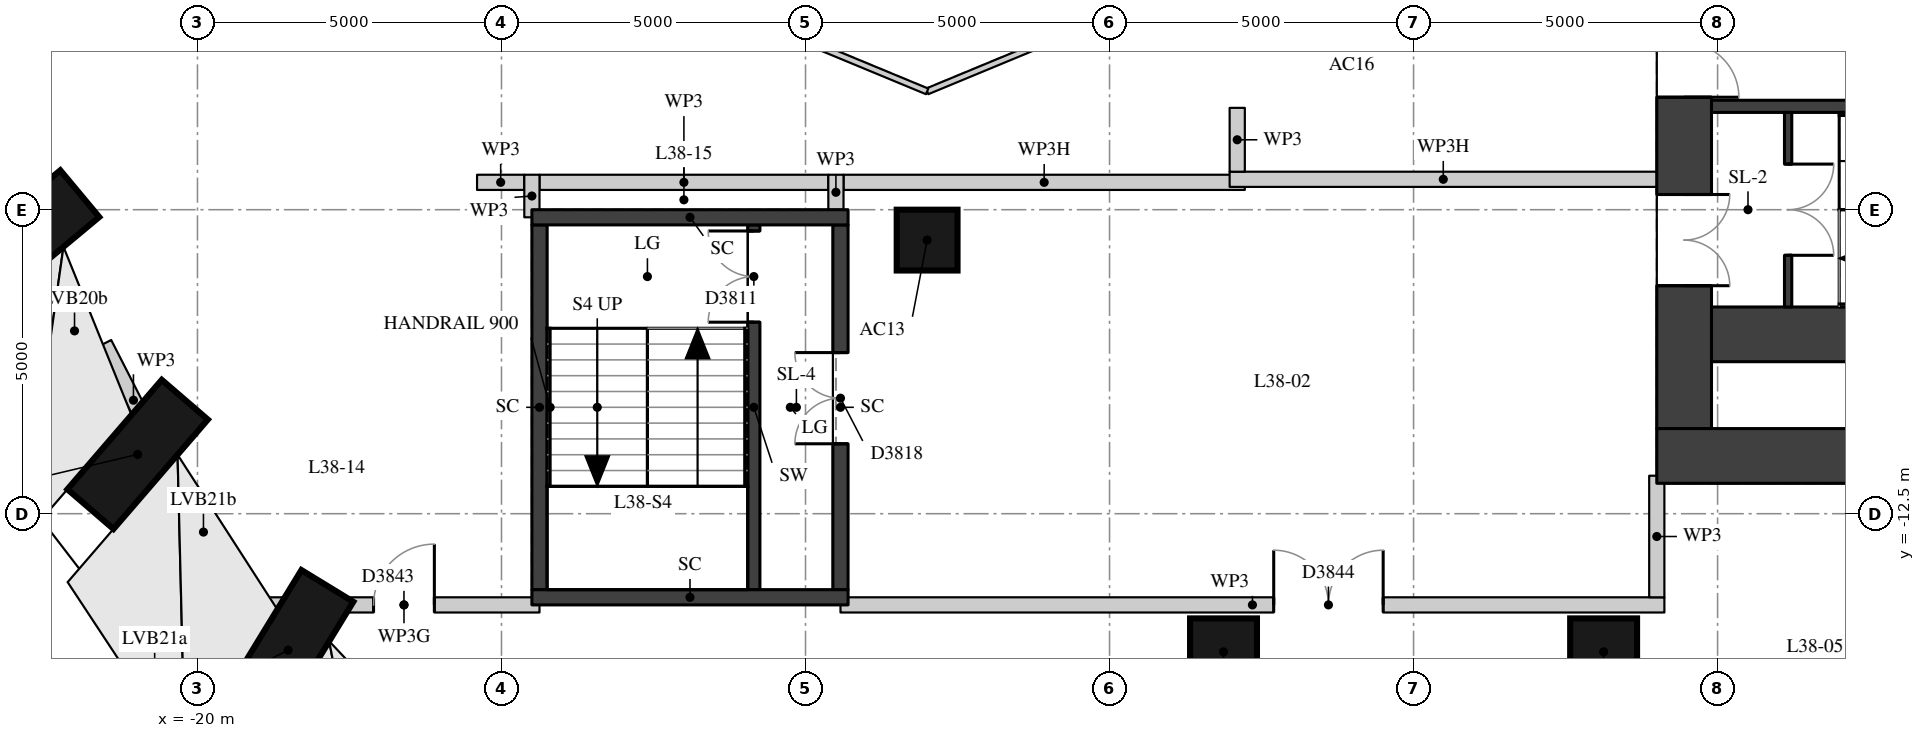
"""IFC4 building model, lengths in metres.
Left out: names, types, materials, properties, quantities, classifications, styles, units other than length and angle.
Written with IfcOpenShell. Run it as: python <this file> out.ifc"""

import sys

from ifc_helpers import new_model, si_unit, direction, frame, frame_2d, origin, origin_2d, place, context, subcontext, project, spatial, rectangle, extrude, element, fill, save


model = new_model("IFC4")
c1 = context("Model", 3, precision=1e-05, world=origin(), true_north=direction((0.0, 1.0)))
c2 = subcontext(c1, "Body", "Model", "MODEL_VIEW")
j1 = project(units=[si_unit("LENGTHUNIT", "METRE"), si_unit("PLANEANGLEUNIT", "RADIAN")], contexts=[c1])
p1 = place(None, origin())
s1 = spatial("IfcSite", under=j1, at=p1, CompositionType="ELEMENT")
p2 = place(p1, origin())
s2 = spatial("IfcBuilding", under=s1, at=p2, CompositionType="ELEMENT")
p3 = place(p2, frame((0.0, 0.0, 135.1)))
s3 = spatial("IfcBuildingStorey", under=s2, at=p3, CompositionType="ELEMENT", Elevation=135.1)
p4 = place(p3, frame((-24.854, -4.707, 0.373), z_axis=(0.429979574031, 0.250055041609, 0.867519476486), x_axis=(-0.749926104207, -0.436120259001, 0.497403214624)))
e1 = element("IfcColumn", 1, at=p4, inside=s3, PredefinedType="COLUMN", context=c2, shape_type="SweptSolid", body=[
    extrude(rectangle(XDim=1.5, YDim=1.0, at=origin_2d()), origin(), (0.0, 0.0, 1.0), 4.327),
])
p5 = place(p3, frame((-23.679, -8.689, 0.391), z_axis=(0.40014977533, 0.333402102722, 0.853652854036), x_axis=(-0.655839459848, -0.546441028941, 0.520842399192)))
e2 = element("IfcColumn", 2, at=p5, inside=s3, PredefinedType="COLUMN", context=c2, shape_type="SweptSolid", body=[
    extrude(rectangle(XDim=1.5, YDim=1.0, at=origin_2d()), origin(), (0.0, 0.0, 1.0), 4.356),
])
p6 = place(p3, frame((-21.76, -12.425, 0.406), z_axis=(0.353733709576, 0.410333329248, 0.840534961568), x_axis=(-0.548816872063, -0.636631025443, 0.541757305795)))
e3 = element("IfcColumn", 3, at=p6, inside=s3, PredefinedType="COLUMN", context=c2, shape_type="SweptSolid", body=[
    extrude(rectangle(XDim=1.5, YDim=1.0, at=origin_2d()), origin(), (0.0, 0.0, 1.0), 4.387),
])
p7 = place(p3, frame((-19.156, -15.802, 0.42), z_axis=(0.292324702728, 0.478460012403, 0.828023118462), x_axis=(-0.431700053499, -0.706581452145, 0.560693958674)))
e4 = element("IfcColumn", 4, at=p7, inside=s3, PredefinedType="COLUMN", context=c2, shape_type="SweptSolid", body=[
    extrude(rectangle(XDim=1.5, YDim=1.0, at=origin_2d()), origin(), (0.0, 0.0, 1.0), 4.419),
])
p8 = place(p3, frame((-8.0, -8.0, 0.0), z_axis=(0.0, 0.0, 1.0), x_axis=(1.0, 0.0, 0.0)))
e5 = element("IfcColumn", 5, at=p8, inside=s3, PredefinedType="COLUMN", context=c2, shape_type="SweptSolid", body=[
    extrude(rectangle(XDim=1.0, YDim=1.0, at=origin_2d()), origin(), (0.0, 0.0, 1.0), 4.5),
])
for number, where, z_axis, x_axis in (
    (6, (-3.126, -14.772, 0.0), (0.0, 0.0, 1.0), (1.0, 0.0, 0.0)),
    (7, (3.126, -14.772, 0.0), (0.0, 0.0, 1.0), (1.0, 0.0, 0.0)),
):
    element("IfcColumn", number, at=place(p3, frame(where, z_axis=z_axis, x_axis=x_axis)), inside=s3, PredefinedType="COLUMN", context=c2, shape_type="SweptSolid", body=[
        extrude(rectangle(XDim=1.1, YDim=1.1, at=origin_2d()), origin(), (0.0, 0.0, 1.0), 4.5),
    ])
p9 = place(p3, frame((4.45, -11.1, 0.0), z_axis=(0.0, 0.0, 1.0), x_axis=(0.0, 1.0, 0.0)))
e8 = element("IfcWall", 8, at=p9, inside=s3, PredefinedType="SHEAR", context=c2, shape_type="SweptSolid", body=[
    extrude(rectangle(XDim=22.2, YDim=0.9, at=frame_2d((11.1, 0.0))), origin(), (0.0, 0.0, 1.0), 4.09),
])
p10 = place(p9, frame((2.35, 0.0, 0.0)))
e9 = element("IfcOpeningElement", 9, at=p10, cuts=e8, PredefinedType="OPENING", context=c2, shape_type="SweptSolid", body=[
    extrude(rectangle(XDim=1.5, YDim=2.1, at=frame_2d((0.75, 1.05))), frame((0.0, 0.46, 0.0), z_axis=(0.0, -1.0, 0.0), x_axis=(1.0, 0.0, 0.0)), (0.0, 0.0, 1.0), 0.92),
])
p11 = place(p9, frame((5.45, 0.0, 0.0)))
e10 = element("IfcOpeningElement", 10, at=p11, cuts=e8, PredefinedType="OPENING", context=c2, shape_type="SweptSolid", body=[
    extrude(rectangle(XDim=1.8, YDim=2.1, at=frame_2d((0.9, 1.05))), frame((0.0, 0.46, 0.0), z_axis=(0.0, -1.0, 0.0), x_axis=(1.0, 0.0, 0.0)), (0.0, 0.0, 1.0), 0.92),
])
p12 = place(p9, frame((7.95, 0.0, 0.0)))
e11 = element("IfcOpeningElement", 11, at=p12, cuts=e8, PredefinedType="OPENING", context=c2, shape_type="SweptSolid", body=[
    extrude(rectangle(XDim=1.1, YDim=2.1, at=frame_2d((0.55, 1.05))), frame((0.0, 0.46, 0.0), z_axis=(0.0, -1.0, 0.0), x_axis=(1.0, 0.0, 0.0)), (0.0, 0.0, 1.0), 0.92),
])
p13 = place(p9, frame((10.6, 0.0, 0.0)))
e12 = element("IfcOpeningElement", 12, at=p13, cuts=e8, PredefinedType="OPENING", context=c2, shape_type="SweptSolid", body=[
    extrude(rectangle(XDim=1.0, YDim=2.1, at=frame_2d((0.5, 1.05))), frame((0.0, 0.46, 0.0), z_axis=(0.0, -1.0, 0.0), x_axis=(1.0, 0.0, 0.0)), (0.0, 0.0, 1.0), 0.92),
])
p14 = place(p9, frame((13.15, 0.0, 0.0)))
e13 = element("IfcOpeningElement", 13, at=p14, cuts=e8, PredefinedType="OPENING", context=c2, shape_type="SweptSolid", body=[
    extrude(rectangle(XDim=1.1, YDim=2.1, at=frame_2d((0.55, 1.05))), frame((0.0, 0.46, 0.0), z_axis=(0.0, -1.0, 0.0), x_axis=(1.0, 0.0, 0.0)), (0.0, 0.0, 1.0), 0.92),
])
p15 = place(p9, frame((14.95, 0.0, 0.0)))
e14 = element("IfcOpeningElement", 14, at=p15, cuts=e8, PredefinedType="OPENING", context=c2, shape_type="SweptSolid", body=[
    extrude(rectangle(XDim=1.8, YDim=2.1, at=frame_2d((0.9, 1.05))), frame((0.0, 0.46, 0.0), z_axis=(0.0, -1.0, 0.0), x_axis=(1.0, 0.0, 0.0)), (0.0, 0.0, 1.0), 0.92),
])
p16 = place(p9, frame((18.35, 0.0, 0.0)))
e15 = element("IfcOpeningElement", 15, at=p16, cuts=e8, PredefinedType="OPENING", context=c2, shape_type="SweptSolid", body=[
    extrude(rectangle(XDim=1.5, YDim=2.1, at=frame_2d((0.75, 1.05))), frame((0.0, 0.46, 0.0), z_axis=(0.0, -1.0, 0.0), x_axis=(1.0, 0.0, 0.0)), (0.0, 0.0, 1.0), 0.92),
])
p17 = place(p3, frame((4.0, -11.55, 0.0), z_axis=(0.0, 0.0, 1.0), x_axis=(1.0, 0.0, 0.0)))
e16 = element("IfcWall", 16, at=p17, inside=s3, PredefinedType="SHEAR", context=c2, shape_type="SweptSolid", body=[
    extrude(rectangle(XDim=15.2, YDim=0.9, at=frame_2d((7.6, 0.0))), origin(), (0.0, 0.0, 1.0), 4.09),
])
p18 = place(p3, frame((4.9, -9.55, 0.0), z_axis=(0.0, 0.0, 1.0), x_axis=(1.0, 0.0, 0.0)))
e17 = element("IfcWall", 17, at=p18, inside=s3, PredefinedType="SHEAR", context=c2, shape_type="SweptSolid", body=[
    extrude(rectangle(XDim=10.2, YDim=0.9, at=frame_2d((5.1, 0.0))), origin(), (0.0, 0.0, 1.0), 4.09),
])
p19 = place(p3, frame((4.9, -5.8, 0.0), z_axis=(0.0, 0.0, 1.0), x_axis=(1.0, 0.0, 0.0)))
e18 = element("IfcWall", 18, at=p19, inside=s3, PredefinedType="SHEAR", context=c2, shape_type="SweptSolid", body=[
    extrude(rectangle(XDim=10.2, YDim=0.2, at=frame_2d((5.1, 0.0))), origin(), (0.0, 0.0, 1.0), 4.09),
])
p20 = place(p3, frame((6.16, -9.1, 0.0), z_axis=(0.0, 0.0, 1.0), x_axis=(0.0, 1.0, 0.0)))
e19 = element("IfcWall", 19, at=p20, inside=s3, PredefinedType="SHEAR", context=c2, shape_type="SweptSolid", body=[
    extrude(rectangle(XDim=3.2, YDim=0.12, at=frame_2d((1.6, 0.0))), origin(), (0.0, 0.0, 1.0), 4.09),
])
p21 = place(p20, frame((0.85, 0.0, 0.0)))
e20 = element("IfcOpeningElement", 20, at=p21, cuts=e19, PredefinedType="OPENING", context=c2, shape_type="SweptSolid", body=[
    extrude(rectangle(XDim=1.5, YDim=2.1, at=frame_2d((0.75, 1.05))), frame((0.0, 0.07, 0.0), z_axis=(0.0, -1.0, 0.0), x_axis=(1.0, 0.0, 0.0)), (0.0, 0.0, 1.0), 0.14),
])
p22 = place(p3, frame((-10.85, -13.75, 0.0), z_axis=(0.0, 0.0, 1.0), x_axis=(0.0, 1.0, 0.0)))
e21 = element("IfcWall", 21, at=p22, inside=s3, PredefinedType="SHEAR", context=c2, shape_type="SweptSolid", body=[
    extrude(rectangle(XDim=6.0, YDim=0.2, at=frame_2d((3.0, 0.0))), origin(), (0.0, 0.0, 1.0), 4.09),
])
p23 = place(p22, frame((4.4, 0.0, 0.0)))
e22 = element("IfcOpeningElement", 22, at=p23, cuts=e21, PredefinedType="OPENING", context=c2, shape_type="SweptSolid", body=[
    extrude(rectangle(XDim=1.5, YDim=2.1, at=frame_2d((0.75, 1.05))), frame((0.0, 0.11, 0.0), z_axis=(0.0, -1.0, 0.0), x_axis=(1.0, 0.0, 0.0)), (0.0, 0.0, 1.0), 0.22),
])
p24 = place(p3, frame((-14.375, -13.75, -0.45), z_axis=(0.0, 0.0, 1.0), x_axis=(0.0, 1.0, 0.0)))
e23 = element("IfcWall", 23, at=p24, inside=s3, PredefinedType="SHEAR", context=c2, shape_type="SweptSolid", body=[
    extrude(rectangle(XDim=6.0, YDim=0.25, at=frame_2d((3.0, 0.0))), origin(), (0.0, 0.0, 1.0), 4.54),
])
p25 = place(p3, frame((-9.425, -13.75, -0.45), z_axis=(0.0, 0.0, 1.0), x_axis=(0.0, 1.0, 0.0)))
e24 = element("IfcWall", 24, at=p25, inside=s3, PredefinedType="SHEAR", context=c2, shape_type="SweptSolid", body=[
    extrude(rectangle(XDim=6.0, YDim=0.25, at=frame_2d((3.0, 0.0))), origin(), (0.0, 0.0, 1.0), 4.54),
])
p26 = place(p25, frame((2.4, 0.0, 0.45)))
e25 = element("IfcOpeningElement", 25, at=p26, cuts=e24, PredefinedType="OPENING", context=c2, shape_type="SweptSolid", body=[
    extrude(rectangle(XDim=1.5, YDim=2.1, at=frame_2d((0.75, 1.05))), frame((0.0, 0.135, 0.0), z_axis=(0.0, -1.0, 0.0), x_axis=(1.0, 0.0, 0.0)), (0.0, 0.0, 1.0), 0.27),
])
for number, where, z_axis, x_axis in (
    (26, (-14.5, -7.625, -0.45), (0.0, 0.0, 1.0), (1.0, 0.0, 0.0)),
    (27, (-14.5, -13.875, -0.45), (0.0, 0.0, 1.0), (1.0, 0.0, 0.0)),
):
    element("IfcWall", number, at=place(p3, frame(where, z_axis=z_axis, x_axis=x_axis)), inside=s3, PredefinedType="SHEAR", context=c2, shape_type="SweptSolid", body=[
        extrude(rectangle(XDim=5.2, YDim=0.25, at=frame_2d((2.6, 0.0))), origin(), (0.0, 0.0, 1.0), 4.54),
    ])
p27 = place(p3, frame((-18.136, -14.744, 0.0), z_axis=(0.0, 0.0, 1.0), x_axis=(0.739013344321, -0.673690787317, 0.0)))
e28 = element("IfcWall", 28, at=p27, inside=s3, PredefinedType="PARTITIONING", context=c2, shape_type="SweptSolid", body=[
    extrude(rectangle(XDim=3.233, YDim=0.25, at=frame_2d((1.616, 0.0))), origin(), (0.0, 0.0, 1.0), 4.09),
])
p28 = place(p3, frame((-21.53, -9.7, 0.0), z_axis=(0.0, 0.0, 1.0), x_axis=(0.455067973608, -0.890456702707, 0.0)))
e29 = element("IfcWall", 29, at=p28, inside=s3, PredefinedType="PARTITIONING", context=c2, shape_type="SweptSolid", body=[
    extrude(rectangle(XDim=2.097, YDim=0.25, at=frame_2d((1.048, 0.0))), origin(), (0.0, 0.0, 1.0), 4.09),
])
p29 = place(p3, frame((-18.832, -14.0, 0.0), z_axis=(0.0, 0.0, 1.0), x_axis=(1.0, 0.0, 0.0)))
e30 = element("IfcWall", 30, at=p29, inside=s3, PredefinedType="PARTITIONING", context=c2, shape_type="SweptSolid", body=[
    extrude(rectangle(XDim=4.457, YDim=0.25, at=frame_2d((2.229, 0.0))), origin(), (0.0, 0.0, 1.0), 3.64),
])
p30 = place(p29, frame((1.728, 0.0, 0.0)))
e31 = element("IfcOpeningElement", 31, at=p30, cuts=e30, PredefinedType="OPENING", context=c2, shape_type="SweptSolid", body=[
    extrude(rectangle(XDim=1.0, YDim=2.1, at=frame_2d((0.5, 1.05))), frame((0.0, 0.135, 0.0), z_axis=(0.0, -1.0, 0.0), x_axis=(1.0, 0.0, 0.0)), (0.0, 0.0, 1.0), 0.27),
])
p31 = place(p3, frame((-9.425, -14.0, 0.0), z_axis=(0.0, 0.0, 1.0), x_axis=(1.0, 0.0, 0.0)))
e32 = element("IfcWall", 32, at=p31, inside=s3, PredefinedType="PARTITIONING", context=c2, shape_type="SweptSolid", body=[
    extrude(rectangle(XDim=13.55, YDim=0.25, at=frame_2d((6.775, 0.0))), origin(), (0.0, 0.0, 1.0), 4.09),
])
p32 = place(p31, frame((7.125, 0.0, 0.0)))
e33 = element("IfcOpeningElement", 33, at=p32, cuts=e32, PredefinedType="OPENING", context=c2, shape_type="SweptSolid", body=[
    extrude(rectangle(XDim=1.8, YDim=2.1, at=frame_2d((0.9, 1.05))), frame((0.0, 0.135, 0.0), z_axis=(0.0, -1.0, 0.0), x_axis=(1.0, 0.0, 0.0)), (0.0, 0.0, 1.0), 0.27),
])
p33 = place(p3, frame((-15.402, -7.05, 0.0), z_axis=(0.0, 0.0, 1.0), x_axis=(1.0, 0.0, 0.0)))
e34 = element("IfcWall", 34, at=p33, inside=s3, PredefinedType="PARTITIONING", context=c2, shape_type="SweptSolid", body=[
    extrude(rectangle(XDim=0.777, YDim=0.25, at=frame_2d((0.389, 0.0))), origin(), (0.0, 0.0, 1.0), 4.09),
])
p34 = place(p3, frame((-14.375, -7.05, 0.0), z_axis=(0.0, 0.0, 1.0), x_axis=(1.0, 0.0, 0.0)))
e35 = element("IfcWall", 35, at=p34, inside=s3, PredefinedType="PARTITIONING", context=c2, shape_type="SweptSolid", body=[
    extrude(rectangle(XDim=4.75, YDim=0.25, at=frame_2d((2.375, 0.0))), origin(), (0.0, 0.0, 1.0), 4.09),
])
p35 = place(p3, frame((-9.375, -7.05, 0.0), z_axis=(0.0, 0.0, 1.0), x_axis=(1.0, 0.0, 0.0)))
e36 = element("IfcWall", 36, at=p35, inside=s3, PredefinedType="PARTITIONING", context=c2, shape_type="SweptSolid", body=[
    extrude(rectangle(XDim=6.6, YDim=0.25, at=frame_2d((3.3, 0.0))), origin(), (0.0, 0.0, 1.0), 3.54),
])
p36 = place(p3, frame((-3.025, -7.0, 0.0), z_axis=(0.0, 0.0, 1.0), x_axis=(1.0, 0.0, 0.0)))
e37 = element("IfcWall", 37, at=p36, inside=s3, PredefinedType="PARTITIONING", context=c2, shape_type="SweptSolid", body=[
    extrude(rectangle(XDim=7.027, YDim=0.25, at=frame_2d((3.513, 0.0))), origin(), (0.0, 0.0, 1.0), 3.54),
])
p37 = place(p3, frame((-14.5, -7.625, 0.0), z_axis=(0.0, 0.0, 1.0), x_axis=(0.0, 1.0, 0.0)))
e38 = element("IfcWall", 38, at=p37, inside=s3, PredefinedType="PARTITIONING", context=c2, shape_type="SweptSolid", body=[
    extrude(rectangle(XDim=0.7, YDim=0.25, at=frame_2d((0.35, 0.0))), origin(), (0.0, 0.0, 1.0), 4.09),
])
p38 = place(p3, frame((-9.5, -7.502, 0.0), z_axis=(0.0, 0.0, 1.0), x_axis=(0.0, 1.0, 0.0)))
e39 = element("IfcWall", 39, at=p38, inside=s3, PredefinedType="PARTITIONING", context=c2, shape_type="SweptSolid", body=[
    extrude(rectangle(XDim=0.577, YDim=0.25, at=frame_2d((0.289, 0.0))), origin(), (0.0, 0.0, 1.0), 4.09),
])
p39 = place(p3, frame((-2.9, -6.875, 0.0), z_axis=(0.0, 0.0, 1.0), x_axis=(0.0, 1.0, 0.0)))
e40 = element("IfcWall", 40, at=p39, inside=s3, PredefinedType="PARTITIONING", context=c2, shape_type="SweptSolid", body=[
    extrude(rectangle(XDim=1.05, YDim=0.25, at=frame_2d((0.525, 0.0))), origin(), (0.0, 0.0, 1.0), 4.09),
])
p40 = place(p3, frame((4.0, -13.875, 0.0), z_axis=(0.0, 0.0, 1.0), x_axis=(0.0, 1.0, 0.0)))
e41 = element("IfcWall", 41, at=p40, inside=s3, PredefinedType="PARTITIONING", context=c2, shape_type="SweptSolid", body=[
    extrude(rectangle(XDim=2.0, YDim=0.25, at=frame_2d((1.0, 0.0))), origin(), (0.0, 0.0, 1.0), 4.09),
])
for number, where, z_axis, x_axis in (
    (42, (-4.073, -3.927, 0.0), (0.0, 0.0, 1.0), (-0.924, -0.383, 0.0)),
    (43, (-8.0, -5.554, 0.0), (0.0, 0.0, 1.0), (-0.924, 0.383, 0.0)),
):
    element("IfcWall", number, at=place(p3, frame(where, z_axis=z_axis, x_axis=x_axis)), inside=s3, PredefinedType="PARTITIONING", context=c2, shape_type="SweptSolid", body=[
        extrude(rectangle(XDim=4.251, YDim=0.1, at=frame_2d((2.125, 0.0))), origin(), (0.0, 0.0, 1.0), 4.09),
    ])
p41 = place(p10, origin())
e44 = element("IfcDoor", 44, at=p41, inside=s3, OperationType="DOUBLE_DOOR_SINGLE_SWING", PredefinedType="DOOR", context=c2, shape_type="SweptSolid", body=[
    extrude(rectangle(XDim=1.5, YDim=2.1, at=frame_2d((0.75, 1.05))), frame((0.0, 0.025, 0.0), z_axis=(0.0, -1.0, 0.0), x_axis=(1.0, 0.0, 0.0)), (0.0, 0.0, 1.0), 0.05),
])
fill(e9, e44)
p42 = place(p11, origin())
e45 = element("IfcDoor", 45, at=p42, inside=s3, OperationType="DOUBLE_DOOR_SINGLE_SWING", PredefinedType="DOOR", context=c2, shape_type="SweptSolid", body=[
    extrude(rectangle(XDim=1.8, YDim=2.1, at=frame_2d((0.9, 1.05))), frame((0.0, 0.025, 0.0), z_axis=(0.0, -1.0, 0.0), x_axis=(1.0, 0.0, 0.0)), (0.0, 0.0, 1.0), 0.05),
])
fill(e10, e45)
p43 = place(p21, origin())
e46 = element("IfcDoor", 46, at=p43, inside=s3, OperationType="DOUBLE_DOOR_SINGLE_SWING", PredefinedType="DOOR", context=c2, shape_type="SweptSolid", body=[
    extrude(rectangle(XDim=1.5, YDim=2.1, at=frame_2d((0.75, 1.05))), frame((0.0, 0.025, 0.0), z_axis=(0.0, -1.0, 0.0), x_axis=(1.0, 0.0, 0.0)), (0.0, 0.0, 1.0), 0.05),
])
fill(e20, e46)
p44 = place(p23, origin())
e47 = element("IfcDoor", 47, at=p44, inside=s3, OperationType="DOUBLE_DOOR_SINGLE_SWING", PredefinedType="DOOR", context=c2, shape_type="SweptSolid", body=[
    extrude(rectangle(XDim=1.5, YDim=2.1, at=frame_2d((0.75, 1.05))), frame((0.0, 0.025, 0.0), z_axis=(0.0, -1.0, 0.0), x_axis=(1.0, 0.0, 0.0)), (0.0, 0.0, 1.0), 0.05),
])
fill(e22, e47)
p45 = place(p26, origin())
e48 = element("IfcDoor", 48, at=p45, inside=s3, OperationType="DOUBLE_DOOR_SINGLE_SWING", PredefinedType="DOOR", context=c2, shape_type="SweptSolid", body=[
    extrude(rectangle(XDim=1.5, YDim=2.1, at=frame_2d((0.75, 1.05))), frame((0.0, 0.025, 0.0), z_axis=(0.0, -1.0, 0.0), x_axis=(1.0, 0.0, 0.0)), (0.0, 0.0, 1.0), 0.05),
])
fill(e25, e48)
p46 = place(p32, origin())
e49 = element("IfcDoor", 49, at=p46, inside=s3, OperationType="DOUBLE_DOOR_SINGLE_SWING", PredefinedType="DOOR", context=c2, shape_type="SweptSolid", body=[
    extrude(rectangle(XDim=1.8, YDim=2.1, at=frame_2d((0.9, 1.05))), frame((0.0, 0.025, 0.0), z_axis=(0.0, -1.0, 0.0), x_axis=(1.0, 0.0, 0.0)), (0.0, 0.0, 1.0), 0.05),
])
fill(e33, e49)
p47 = place(p30, origin())
e50 = element("IfcDoor", 50, at=p47, inside=s3, OperationType="SINGLE_SWING_RIGHT", PredefinedType="DOOR", context=c2, shape_type="SweptSolid", body=[
    extrude(rectangle(XDim=1.0, YDim=2.1, at=frame_2d((0.5, 1.05))), frame((0.0, 0.025, 0.0), z_axis=(0.0, -1.0, 0.0), x_axis=(1.0, 0.0, 0.0)), (0.0, 0.0, 1.0), 0.05),
])
fill(e31, e50)
save(model, sys.argv[1])
